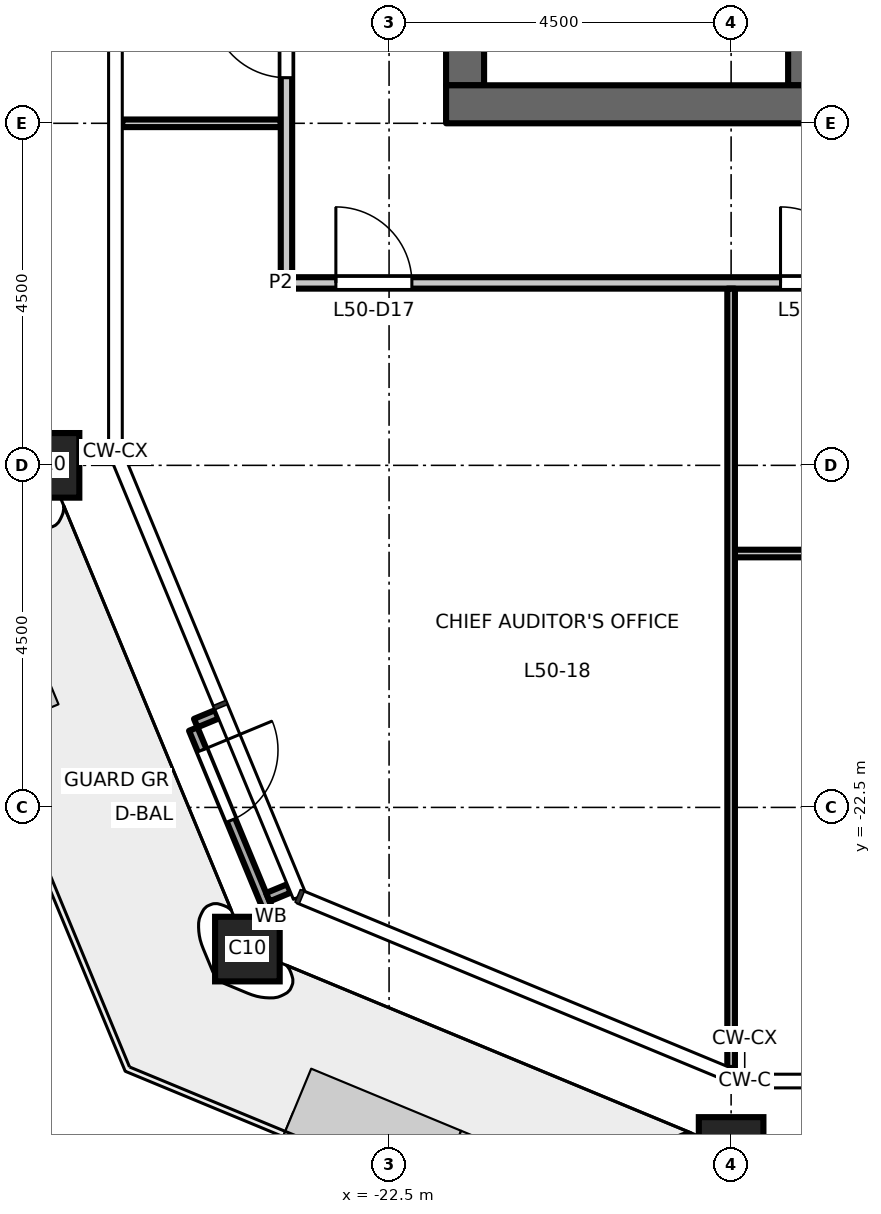
"""IFC4 building model, lengths in metres.
Left out: names, types, materials, properties, quantities, classifications, styles, units other than length and angle.
Written with IfcOpenShell. Run it as: python <this file> out.ifc"""

import sys

from ifc_helpers import new_model, si_unit, direction, frame, frame_2d, origin, origin_2d, place, context, subcontext, project, spatial, rectangle, hollow_rectangle, extrude, element, fill, save


model = new_model("IFC4")
c1 = context("Model", 3, precision=1e-05, world=origin(), true_north=direction((0.0, 1.0)))
c2 = subcontext(c1, "Body", "Model", "MODEL_VIEW")
j1 = project(units=[si_unit("LENGTHUNIT", "METRE"), si_unit("PLANEANGLEUNIT", "RADIAN")], contexts=[c1])
p1 = place(None, origin())
s1 = spatial("IfcSite", under=j1, at=p1, CompositionType="ELEMENT")
p2 = place(p1, origin())
s2 = spatial("IfcBuilding", under=s1, at=p2, CompositionType="ELEMENT")
p3 = place(p2, frame((0.0, 0.0, 233.2)))
s3 = spatial("IfcBuildingStorey", under=s2, at=p3, CompositionType="ELEMENT", Elevation=233.2)
for number, where, z_axis, x_axis in (
    (1, (-18.0, -27.0, 0.0), (0.0, 0.0, 1.0), (1.0, 0.0, 0.0)),
    (2, (-27.0, -18.0, 0.0), (0.0, 0.0, 1.0), (1.0, 0.0, 0.0)),
    (3, (-24.364, -24.364, 0.0), (0.0, 0.0, 1.0), (1.0, 0.0, 0.0)),
):
    element("IfcColumn", number, at=place(p3, frame(where, z_axis=z_axis, x_axis=x_axis)), inside=s3, PredefinedType="COLUMN", context=c2, shape_type="SweptSolid", body=[
        extrude(hollow_rectangle(XDim=0.85, YDim=0.85, WallThickness=0.05, at=origin_2d()), origin(), (0.0, 0.0, 1.0), 4.5),
    ])
p4 = place(p3, frame((-21.5, -13.0, 0.0), z_axis=(0.0, 0.0, 1.0), x_axis=(0.0, 1.0, 0.0)))
e4 = element("IfcWall", 4, at=p4, inside=s3, PredefinedType="SHEAR", context=c2, shape_type="SweptSolid", body=[
    extrude(rectangle(XDim=26.0, YDim=0.5, at=frame_2d((13.0, 0.0))), origin(), (0.0, 0.0, 1.0), 4.35),
])
p5 = place(p4, frame((16.825, 0.0, 0.0)))
e5 = element("IfcOpeningElement", 5, at=p5, cuts=e4, PredefinedType="OPENING", context=c2, shape_type="SweptSolid", body=[
    extrude(rectangle(XDim=1.8, YDim=2.1, at=frame_2d((0.9, 1.05))), frame((0.0, 0.26, 0.0), z_axis=(0.0, -1.0, 0.0), x_axis=(1.0, 0.0, 0.0)), (0.0, 0.0, 1.0), 0.52),
])
p6 = place(p4, frame((7.375, 0.0, 0.0)))
e6 = element("IfcOpeningElement", 6, at=p6, cuts=e4, PredefinedType="OPENING", context=c2, shape_type="SweptSolid", body=[
    extrude(rectangle(XDim=1.8, YDim=2.1, at=frame_2d((0.9, 1.05))), frame((0.0, 0.26, 0.0), z_axis=(0.0, -1.0, 0.0), x_axis=(1.0, 0.0, 0.0)), (0.0, 0.0, 1.0), 0.52),
])
p7 = place(p3, frame((-17.0, -13.0, 0.0), z_axis=(0.0, 0.0, 1.0), x_axis=(0.0, 1.0, 0.0)))
e7 = element("IfcWall", 7, at=p7, inside=s3, PredefinedType="SHEAR", context=c2, shape_type="SweptSolid", body=[
    extrude(rectangle(XDim=6.575, YDim=0.5, at=frame_2d((3.288, 0.0))), origin(), (0.0, 0.0, 1.0), 4.35),
])
p8 = place(p3, frame((-8.25, -13.25, 0.0), z_axis=(0.0, 0.0, 1.0), x_axis=(-1.0, 0.0, 0.0)))
e8 = element("IfcWall", 8, at=p8, inside=s3, PredefinedType="SHEAR", context=c2, shape_type="SweptSolid", body=[
    extrude(rectangle(XDim=13.5, YDim=0.5, at=frame_2d((6.75, 0.0))), origin(), (0.0, 0.0, 1.0), 4.35),
])
p9 = place(p3, frame((-24.766, -21.276, 0.0), z_axis=(0.0, 0.0, 1.0), x_axis=(-0.923917630863, -0.382591441855, 0.0)))
e9 = element("IfcWall", 9, at=p9, inside=s3, PredefinedType="STANDARD", context=c2, shape_type="SweptSolid", body=[
    extrude(rectangle(XDim=0.3, YDim=0.12, at=frame_2d((0.15, 0.0))), origin(), (0.0, 0.0, 1.0), 4.35),
])
p10 = place(p3, frame((-23.818, -23.566, 0.0), z_axis=(0.0, 0.0, 1.0), x_axis=(-0.923629715641, -0.383285987724, 0.0)))
e10 = element("IfcWall", 10, at=p10, inside=s3, PredefinedType="STANDARD", context=c2, shape_type="SweptSolid", body=[
    extrude(rectangle(XDim=0.3, YDim=0.12, at=frame_2d((0.15, 0.0))), origin(), (0.0, 0.0, 1.0), 4.35),
])
p11 = place(p3, frame((-25.076, -21.469, 0.0), z_axis=(0.0, 0.0, 1.0), x_axis=(0.382636771556, -0.923898858671, 0.0)))
e11 = element("IfcWall", 11, at=p11, inside=s3, PredefinedType="STANDARD", context=c2, shape_type="SweptSolid", body=[
    extrude(rectangle(XDim=2.673, YDim=0.12, at=frame_2d((1.337, 0.0))), origin(), (0.0, 0.0, 1.0), 4.35),
])
p12 = place(p11, frame((0.3, 0.0, 0.0)))
e12 = element("IfcOpeningElement", 12, at=p12, cuts=e11, PredefinedType="OPENING", context=c2, shape_type="SweptSolid", body=[
    extrude(rectangle(XDim=1.0, YDim=2.4, at=frame_2d((0.5, 1.2))), frame((0.0, 0.07, 0.0), z_axis=(0.0, -1.0, 0.0), x_axis=(1.0, 0.0, 0.0)), (0.0, 0.0, 1.0), 0.14),
])
p13 = place(p3, frame((-17.95, -19.16, 0.0), z_axis=(0.0, 0.0, 1.0), x_axis=(1.0, 0.0, 0.0)))
e13 = element("IfcWall", 13, at=p13, inside=s3, PredefinedType="PARTITIONING", context=c2, shape_type="SweptSolid", body=[
    extrude(rectangle(XDim=8.9, YDim=0.1, at=frame_2d((4.45, 0.0))), origin(), (0.0, 0.0, 1.0), 4.35),
])
p14 = place(p13, frame((7.35, 0.0, 0.0)))
e14 = element("IfcOpeningElement", 14, at=p14, cuts=e13, PredefinedType="OPENING", context=c2, shape_type="SweptSolid", body=[
    extrude(rectangle(XDim=1.0, YDim=2.1, at=frame_2d((0.5, 1.05))), frame((0.0, 0.06, 0.0), z_axis=(0.0, -1.0, 0.0), x_axis=(1.0, 0.0, 0.0)), (0.0, 0.0, 1.0), 0.12),
])
p15 = place(p3, frame((-23.925, -15.6, 0.0), z_axis=(0.0, 0.0, 1.0), x_axis=(1.0, 0.0, 0.0)))
e15 = element("IfcWall", 15, at=p15, inside=s3, PredefinedType="PARTITIONING", context=c2, shape_type="SweptSolid", body=[
    extrude(rectangle(XDim=47.85, YDim=0.15, at=frame_2d((23.925, 0.0))), origin(), (0.0, 0.0, 1.0), 4.35),
])
p16 = place(p15, frame((6.575, 0.0, 0.0)))
e16 = element("IfcOpeningElement", 16, at=p16, cuts=e15, PredefinedType="OPENING", context=c2, shape_type="SweptSolid", body=[
    extrude(rectangle(XDim=1.0, YDim=2.1, at=frame_2d((0.5, 1.05))), frame((0.0, 0.085, 0.0), z_axis=(0.0, -1.0, 0.0), x_axis=(1.0, 0.0, 0.0)), (0.0, 0.0, 1.0), 0.17),
])
p17 = place(p15, frame((15.575, 0.0, 0.0)))
e17 = element("IfcOpeningElement", 17, at=p17, cuts=e15, PredefinedType="OPENING", context=c2, shape_type="SweptSolid", body=[
    extrude(rectangle(XDim=1.0, YDim=2.1, at=frame_2d((0.5, 1.05))), frame((0.0, 0.085, 0.0), z_axis=(0.0, -1.0, 0.0), x_axis=(1.0, 0.0, 0.0)), (0.0, 0.0, 1.0), 0.17),
])
p18 = place(p15, frame((24.575, 0.0, 0.0)))
e18 = element("IfcOpeningElement", 18, at=p18, cuts=e15, PredefinedType="OPENING", context=c2, shape_type="SweptSolid", body=[
    extrude(rectangle(XDim=1.0, YDim=2.1, at=frame_2d((0.5, 1.05))), frame((0.0, 0.085, 0.0), z_axis=(0.0, -1.0, 0.0), x_axis=(1.0, 0.0, 0.0)), (0.0, 0.0, 1.0), 0.17),
])
p19 = place(p15, frame((40.325, 0.0, 0.0)))
e19 = element("IfcOpeningElement", 19, at=p19, cuts=e15, PredefinedType="OPENING", context=c2, shape_type="SweptSolid", body=[
    extrude(rectangle(XDim=1.0, YDim=2.1, at=frame_2d((0.5, 1.05))), frame((0.0, 0.085, 0.0), z_axis=(0.0, -1.0, 0.0), x_axis=(1.0, 0.0, 0.0)), (0.0, 0.0, 1.0), 0.17),
])
p20 = place(p15, frame((0.725, 0.0, 0.0)))
e20 = element("IfcOpeningElement", 20, at=p20, cuts=e15, PredefinedType="OPENING", context=c2, shape_type="SweptSolid", body=[
    extrude(rectangle(XDim=1.0, YDim=2.1, at=frame_2d((0.5, 1.05))), frame((0.0, 0.085, 0.0), z_axis=(0.0, -1.0, 0.0), x_axis=(1.0, 0.0, 0.0)), (0.0, 0.0, 1.0), 0.17),
])
p21 = place(p15, frame((46.075, 0.0, 0.0)))
e21 = element("IfcOpeningElement", 21, at=p21, cuts=e15, PredefinedType="OPENING", context=c2, shape_type="SweptSolid", body=[
    extrude(rectangle(XDim=1.0, YDim=2.1, at=frame_2d((0.5, 1.05))), frame((0.0, 0.085, 0.0), z_axis=(0.0, -1.0, 0.0), x_axis=(1.0, 0.0, 0.0)), (0.0, 0.0, 1.0), 0.17),
])
p22 = place(p3, frame((-26.01, -13.5, 0.0), z_axis=(0.0, 0.0, 1.0), x_axis=(1.0, 0.0, 0.0)))
e22 = element("IfcWall", 22, at=p22, inside=s3, PredefinedType="PARTITIONING", context=c2, shape_type="SweptSolid", body=[
    extrude(rectangle(XDim=2.085, YDim=0.1, at=frame_2d((1.042, 0.0))), origin(), (0.0, 0.0, 1.0), 3.95),
])
p23 = place(p3, frame((-23.85, -15.525, 0.0), z_axis=(0.0, 0.0, 1.0), x_axis=(0.0, 1.0, 0.0)))
e23 = element("IfcWall", 23, at=p23, inside=s3, PredefinedType="PARTITIONING", context=c2, shape_type="SweptSolid", body=[
    extrude(rectangle(XDim=31.05, YDim=0.15, at=frame_2d((15.525, 0.0))), origin(), (0.0, 0.0, 1.0), 4.35),
])
p24 = place(p23, frame((2.625, 0.0, 0.0)))
e24 = element("IfcOpeningElement", 24, at=p24, cuts=e23, PredefinedType="OPENING", context=c2, shape_type="SweptSolid", body=[
    extrude(rectangle(XDim=1.0, YDim=2.1, at=frame_2d((0.5, 1.05))), frame((0.0, 0.085, 0.0), z_axis=(0.0, -1.0, 0.0), x_axis=(1.0, 0.0, 0.0)), (0.0, 0.0, 1.0), 0.17),
])
p25 = place(p23, frame((13.875, 0.0, 0.0)))
e25 = element("IfcOpeningElement", 25, at=p25, cuts=e23, PredefinedType="OPENING", context=c2, shape_type="SweptSolid", body=[
    extrude(rectangle(XDim=1.0, YDim=2.1, at=frame_2d((0.5, 1.05))), frame((0.0, 0.085, 0.0), z_axis=(0.0, -1.0, 0.0), x_axis=(1.0, 0.0, 0.0)), (0.0, 0.0, 1.0), 0.17),
])
p26 = place(p23, frame((16.125, 0.0, 0.0)))
e26 = element("IfcOpeningElement", 26, at=p26, cuts=e23, PredefinedType="OPENING", context=c2, shape_type="SweptSolid", body=[
    extrude(rectangle(XDim=1.0, YDim=2.1, at=frame_2d((0.5, 1.05))), frame((0.0, 0.085, 0.0), z_axis=(0.0, -1.0, 0.0), x_axis=(1.0, 0.0, 0.0)), (0.0, 0.0, 1.0), 0.17),
])
p27 = place(p23, frame((27.375, 0.0, 0.0)))
e27 = element("IfcOpeningElement", 27, at=p27, cuts=e23, PredefinedType="OPENING", context=c2, shape_type="SweptSolid", body=[
    extrude(rectangle(XDim=1.0, YDim=2.1, at=frame_2d((0.5, 1.05))), frame((0.0, 0.085, 0.0), z_axis=(0.0, -1.0, 0.0), x_axis=(1.0, 0.0, 0.0)), (0.0, 0.0, 1.0), 0.17),
])
p28 = place(p3, frame((-18.0, -25.928, 0.0), z_axis=(0.0, 0.0, 1.0), x_axis=(0.0, 1.0, 0.0)))
e28 = element("IfcWall", 28, at=p28, inside=s3, PredefinedType="PARTITIONING", context=c2, shape_type="SweptSolid", body=[
    extrude(rectangle(XDim=10.253, YDim=0.1, at=frame_2d((5.126, 0.0))), origin(), (0.0, 0.0, 1.0), 3.65),
])
p29 = place(p12, origin())
e29 = element("IfcDoor", 29, at=p29, inside=s3, OperationType="SINGLE_SWING_LEFT", PredefinedType="DOOR", context=c2, shape_type="SweptSolid", body=[
    extrude(rectangle(XDim=1.0, YDim=2.4, at=frame_2d((0.5, 1.2))), frame((0.0, 0.025, 0.0), z_axis=(0.0, -1.0, 0.0), x_axis=(1.0, 0.0, 0.0)), (0.0, 0.0, 1.0), 0.05),
])
fill(e12, e29)
p30 = place(p16, origin())
e30 = element("IfcDoor", 30, at=p30, inside=s3, OperationType="SINGLE_SWING_LEFT", PredefinedType="DOOR", context=c2, shape_type="SweptSolid", body=[
    extrude(rectangle(XDim=1.0, YDim=2.1, at=frame_2d((0.5, 1.05))), frame((0.0, 0.025, 0.0), z_axis=(0.0, -1.0, 0.0), x_axis=(1.0, 0.0, 0.0)), (0.0, 0.0, 1.0), 0.05),
])
fill(e16, e30)
p31 = place(p20, origin())
e31 = element("IfcDoor", 31, at=p31, inside=s3, OperationType="SINGLE_SWING_LEFT", PredefinedType="DOOR", context=c2, shape_type="SweptSolid", body=[
    extrude(rectangle(XDim=1.0, YDim=2.1, at=frame_2d((0.5, 1.05))), frame((0.0, 0.025, 0.0), z_axis=(0.0, -1.0, 0.0), x_axis=(1.0, 0.0, 0.0)), (0.0, 0.0, 1.0), 0.05),
])
fill(e20, e31)
p32 = place(p24, origin())
e32 = element("IfcDoor", 32, at=p32, inside=s3, OperationType="SINGLE_SWING_RIGHT", PredefinedType="DOOR", context=c2, shape_type="SweptSolid", body=[
    extrude(rectangle(XDim=1.0, YDim=2.1, at=frame_2d((0.5, 1.05))), frame((0.0, 0.025, 0.0), z_axis=(0.0, -1.0, 0.0), x_axis=(1.0, 0.0, 0.0)), (0.0, 0.0, 1.0), 0.05),
])
fill(e24, e32)
save(model, sys.argv[1])
